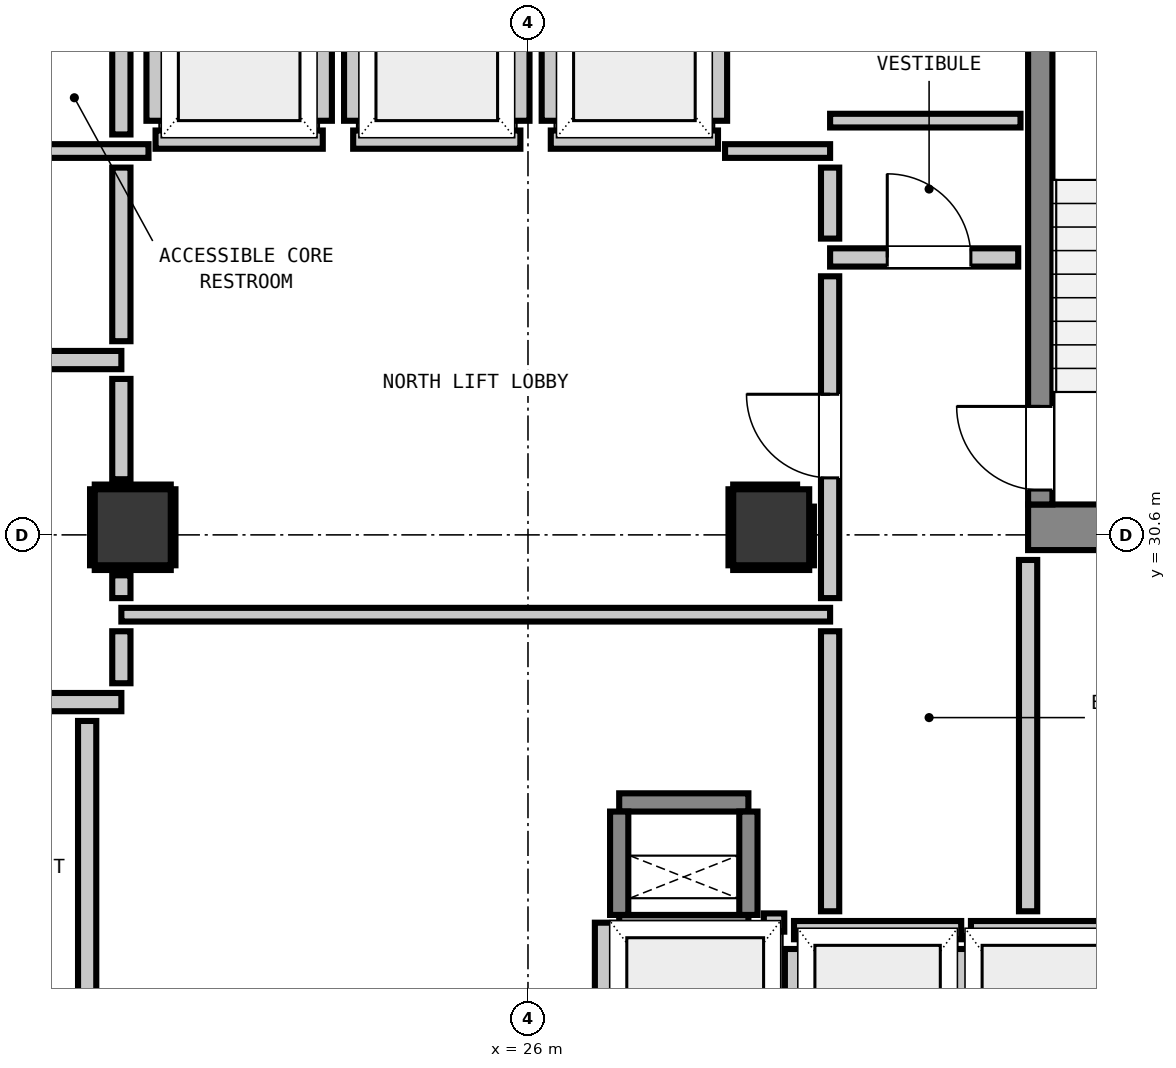
"""IFC4 building model, lengths in metres.
Left out: names, types, materials, properties, quantities, classifications, styles, units other than length and angle.
Written with IfcOpenShell. Run it as: python <this file> out.ifc"""

import sys

from ifc_helpers import new_model, si_unit, direction, frame, frame_2d, origin, origin_2d, place, context, subcontext, project, spatial, rectangle, extrude, element, fill, save


model = new_model("IFC4")
c1 = context("Model", 3, precision=1e-05, world=origin(), true_north=direction((0.0, 1.0)))
c2 = subcontext(c1, "Body", "Model", "MODEL_VIEW")
j1 = project(units=[si_unit("LENGTHUNIT", "METRE"), si_unit("PLANEANGLEUNIT", "RADIAN")], contexts=[c1])
p1 = place(None, origin())
s1 = spatial("IfcSite", under=j1, at=p1, CompositionType="ELEMENT")
p2 = place(p1, origin())
s2 = spatial("IfcBuilding", under=s1, at=p2, CompositionType="ELEMENT")
p3 = place(p2, frame((0.0, 0.0, 68.48)))
s3 = spatial("IfcBuildingStorey", under=s2, at=p3, CompositionType="ELEMENT", Elevation=68.48)
p4 = place(p3, frame((32.58, 30.7, 0.0), z_axis=(0.0, 0.0, 1.0), x_axis=(1.0, 0.0, 0.0)))
e1 = element("IfcWall", 1, at=p4, inside=s3, PredefinedType="SHEAR", context=c2, shape_type="SweptSolid", body=[
    extrude(rectangle(XDim=3.415, YDim=0.6, at=frame_2d((1.708, 0.0))), origin(), (0.0, 0.0, 1.0), 3.32),
])
p5 = place(p3, frame((32.74, 31.0, 0.0), z_axis=(0.0, 0.0, 1.0), x_axis=(0.0, 1.0, 0.0)))
e2 = element("IfcWall", 2, at=p5, inside=s3, PredefinedType="SHEAR", context=c2, shape_type="SweptSolid", body=[
    extrude(rectangle(XDim=7.8, YDim=0.32, at=frame_2d((3.9, 0.0))), origin(), (0.0, 0.0, 1.0), 3.32),
])
p6 = place(p5, frame((0.19, 0.0, 0.0)))
e3 = element("IfcOpeningElement", 3, at=p6, cuts=e2, PredefinedType="OPENING", context=c2, shape_type="SweptSolid", body=[
    extrude(rectangle(XDim=1.1, YDim=2.15, at=frame_2d((0.55, 1.075))), frame((0.0, 0.17, 0.0), z_axis=(0.0, -1.0, 0.0), x_axis=(1.0, 0.0, 0.0)), (0.0, 0.0, 1.0), 0.34),
])
for number, where, z_axis, x_axis in (
    (4, (27.2, 25.48, 0.0), (0.0, 0.0, 1.0), (1.0, 0.0, 0.0)),
    (5, (27.2, 27.08, 0.0), (0.0, 0.0, 1.0), (1.0, 0.0, 0.0)),
):
    element("IfcWall", number, at=place(p3, frame(where, z_axis=z_axis, x_axis=x_axis)), inside=s3, PredefinedType="SHEAR", context=c2, shape_type="SweptSolid", body=[
        extrude(rectangle(XDim=1.7, YDim=0.24, at=frame_2d((0.85, 0.0))), origin(), (0.0, 0.0, 1.0), 3.32),
    ])
for number, where, z_axis, x_axis in (
    (6, (27.2, 25.6, 0.0), (0.0, 0.0, 1.0), (0.0, 1.0, 0.0)),
    (7, (28.9, 25.6, 0.0), (0.0, 0.0, 1.0), (0.0, 1.0, 0.0)),
):
    element("IfcWall", number, at=place(p3, frame(where, z_axis=z_axis, x_axis=x_axis)), inside=s3, PredefinedType="SHEAR", context=c2, shape_type="SweptSolid", body=[
        extrude(rectangle(XDim=1.36, YDim=0.24, at=frame_2d((0.68, 0.0))), origin(), (0.0, 0.0, 1.0), 3.32),
    ])
for number, where, z_axis, x_axis in (
    (8, (20.8, 30.7, 0.0), (0.0, 0.0, 1.0), (1.0, 0.0, 0.0)),
    (9, (29.2, 30.7, 0.0), (0.0, 0.0, 1.0), (1.0, 0.0, 0.0)),
):
    element("IfcColumn", number, at=place(p3, frame(where, z_axis=z_axis, x_axis=x_axis)), inside=s3, PredefinedType="COLUMN", context=c2, shape_type="SweptSolid", body=[
        extrude(rectangle(XDim=1.0, YDim=1.0, at=origin_2d()), origin(), (0.0, 0.0, 1.0), 3.32),
    ])
p7 = place(p3, frame((21.1, 35.8, 0.0), z_axis=(0.0, 0.0, 1.0), x_axis=(1.0, 0.0, 0.0)))
e10 = element("IfcWall", 10, at=p7, inside=s3, PredefinedType="PARTITIONING", context=c2, shape_type="SweptSolid", body=[
    extrude(rectangle(XDim=2.2, YDim=0.24, at=frame_2d((1.1, 0.0))), origin(), (0.0, 0.0, 1.0), 3.06),
])
p8 = place(p3, frame((21.1, 36.048, 0.0), z_axis=(0.0, 0.0, 1.0), x_axis=(0.0, 1.0, 0.0)))
e11 = element("IfcWall", 11, at=p8, inside=s3, PredefinedType="PARTITIONING", context=c2, shape_type="SweptSolid", body=[
    extrude(rectangle(XDim=2.104, YDim=0.24, at=frame_2d((1.052, 0.0))), origin(), (0.0, 0.0, 1.0), 2.295),
])
p9 = place(p3, frame((23.3, 36.048, 0.0), z_axis=(0.0, 0.0, 1.0), x_axis=(0.0, 1.0, 0.0)))
e12 = element("IfcWall", 12, at=p9, inside=s3, PredefinedType="PARTITIONING", context=c2, shape_type="SweptSolid", body=[
    extrude(rectangle(XDim=2.104, YDim=0.24, at=frame_2d((1.052, 0.0))), origin(), (0.0, 0.0, 1.0), 3.06),
])
p10 = place(p3, frame((23.7, 35.8, 0.0), z_axis=(0.0, 0.0, 1.0), x_axis=(1.0, 0.0, 0.0)))
e13 = element("IfcWall", 13, at=p10, inside=s3, PredefinedType="PARTITIONING", context=c2, shape_type="SweptSolid", body=[
    extrude(rectangle(XDim=2.2, YDim=0.24, at=frame_2d((1.1, 0.0))), origin(), (0.0, 0.0, 1.0), 3.06),
])
for number, where, z_axis, x_axis in (
    (14, (23.7, 36.048, 0.0), (0.0, 0.0, 1.0), (0.0, 1.0, 0.0)),
    (15, (25.9, 36.048, 0.0), (0.0, 0.0, 1.0), (0.0, 1.0, 0.0)),
):
    element("IfcWall", number, at=place(p3, frame(where, z_axis=z_axis, x_axis=x_axis)), inside=s3, PredefinedType="PARTITIONING", context=c2, shape_type="SweptSolid", body=[
        extrude(rectangle(XDim=2.104, YDim=0.24, at=frame_2d((1.052, 0.0))), origin(), (0.0, 0.0, 1.0), 3.06),
    ])
p11 = place(p3, frame((26.3, 35.8, 0.0), z_axis=(0.0, 0.0, 1.0), x_axis=(1.0, 0.0, 0.0)))
e16 = element("IfcWall", 16, at=p11, inside=s3, PredefinedType="PARTITIONING", context=c2, shape_type="SweptSolid", body=[
    extrude(rectangle(XDim=2.2, YDim=0.24, at=frame_2d((1.1, 0.0))), origin(), (0.0, 0.0, 1.0), 3.06),
])
for number, where, z_axis, x_axis in (
    (17, (26.3, 36.048, 0.0), (0.0, 0.0, 1.0), (0.0, 1.0, 0.0)),
    (18, (28.5, 36.048, 0.0), (0.0, 0.0, 1.0), (0.0, 1.0, 0.0)),
):
    element("IfcWall", number, at=place(p3, frame(where, z_axis=z_axis, x_axis=x_axis)), inside=s3, PredefinedType="PARTITIONING", context=c2, shape_type="SweptSolid", body=[
        extrude(rectangle(XDim=2.104, YDim=0.24, at=frame_2d((1.052, 0.0))), origin(), (0.0, 0.0, 1.0), 3.06),
    ])
p12 = place(p3, frame((29.5, 25.4, 0.0), z_axis=(0.0, 0.0, 1.0), x_axis=(1.0, 0.0, 0.0)))
e19 = element("IfcWall", 19, at=p12, inside=s3, PredefinedType="PARTITIONING", context=c2, shape_type="SweptSolid", body=[
    extrude(rectangle(XDim=2.2, YDim=0.24, at=frame_2d((1.1, 0.0))), origin(), (0.0, 0.0, 1.0), 3.06),
])
p13 = place(p3, frame((29.5, 22.632, 0.0), z_axis=(0.0, 0.0, 1.0), x_axis=(0.0, 1.0, 0.0)))
e20 = element("IfcWall", 20, at=p13, inside=s3, PredefinedType="PARTITIONING", context=c2, shape_type="SweptSolid", body=[
    extrude(rectangle(XDim=2.52, YDim=0.24, at=frame_2d((1.26, 0.0))), origin(), (0.0, 0.0, 1.0), 2.295),
])
p14 = place(p3, frame((31.7, 22.73, 0.0), z_axis=(0.0, 0.0, 1.0), x_axis=(0.0, 1.0, 0.0)))
e21 = element("IfcWall", 21, at=p14, inside=s3, PredefinedType="PARTITIONING", context=c2, shape_type="SweptSolid", body=[
    extrude(rectangle(XDim=2.422, YDim=0.24, at=frame_2d((1.211, 0.0))), origin(), (0.0, 0.0, 1.0), 3.06),
])
p15 = place(p3, frame((31.828, 25.4, 0.0), z_axis=(0.0, 0.0, 1.0), x_axis=(1.0, 0.0, 0.0)))
e22 = element("IfcWall", 22, at=p15, inside=s3, PredefinedType="PARTITIONING", context=c2, shape_type="SweptSolid", body=[
    extrude(rectangle(XDim=2.072, YDim=0.24, at=frame_2d((1.036, 0.0))), origin(), (0.0, 0.0, 1.0), 3.06),
])
p16 = place(p3, frame((29.103, 25.5, 0.0), z_axis=(0.0, 0.0, 1.0), x_axis=(1.0, 0.0, 0.0)))
e23 = element("IfcWall", 23, at=p16, inside=s3, PredefinedType="PARTITIONING", context=c2, shape_type="SweptSolid", body=[
    extrude(rectangle(XDim=0.269, YDim=0.24, at=frame_2d((0.135, 0.0))), origin(), (0.0, 0.0, 1.0), 3.06),
])
p17 = place(p3, frame((27.0, 22.73, 0.0), z_axis=(0.0, 0.0, 1.0), x_axis=(0.0, 1.0, 0.0)))
e24 = element("IfcWall", 24, at=p17, inside=s3, PredefinedType="PARTITIONING", context=c2, shape_type="SweptSolid", body=[
    extrude(rectangle(XDim=2.768, YDim=0.24, at=frame_2d((1.384, 0.0))), origin(), (0.0, 0.0, 1.0), 3.06),
])
p18 = place(p3, frame((17.45, 28.4, 0.0), z_axis=(0.0, 0.0, 1.0), x_axis=(1.0, 0.0, 0.0)))
e25 = element("IfcWall", 25, at=p18, inside=s3, PredefinedType="PARTITIONING", context=c2, shape_type="SweptSolid", body=[
    extrude(rectangle(XDim=3.2, YDim=0.24, at=frame_2d((1.6, 0.0))), origin(), (0.0, 0.0, 1.0), 3.06),
])
p19 = place(p18, frame((0.784, 0.0, 0.0)))
e26 = element("IfcOpeningElement", 26, at=p19, cuts=e25, PredefinedType="OPENING", context=c2, shape_type="SweptSolid", body=[
    extrude(rectangle(XDim=1.1, YDim=2.15, at=frame_2d((0.55, 1.075))), frame((0.0, 0.13, 0.0), z_axis=(0.0, -1.0, 0.0), x_axis=(1.0, 0.0, 0.0)), (0.0, 0.0, 1.0), 0.26),
])
p20 = place(p3, frame((17.45, 32.9, 0.0), z_axis=(0.0, 0.0, 1.0), x_axis=(1.0, 0.0, 0.0)))
e27 = element("IfcWall", 27, at=p20, inside=s3, PredefinedType="PARTITIONING", context=c2, shape_type="SweptSolid", body=[
    extrude(rectangle(XDim=3.2, YDim=0.24, at=frame_2d((1.6, 0.0))), origin(), (0.0, 0.0, 1.0), 3.06),
])
p21 = place(p20, frame((0.159, 0.0, 0.0)))
e28 = element("IfcOpeningElement", 28, at=p21, cuts=e27, PredefinedType="OPENING", context=c2, shape_type="SweptSolid", body=[
    extrude(rectangle(XDim=1.1, YDim=2.15, at=frame_2d((0.55, 1.075))), frame((0.0, 0.13, 0.0), z_axis=(0.0, -1.0, 0.0), x_axis=(1.0, 0.0, 0.0)), (0.0, 0.0, 1.0), 0.26),
])
p22 = place(p3, frame((29.975, 34.25, 0.0), z_axis=(0.0, 0.0, 1.0), x_axis=(1.0, 0.0, 0.0)))
e29 = element("IfcWall", 29, at=p22, inside=s3, PredefinedType="PARTITIONING", context=c2, shape_type="SweptSolid", body=[
    extrude(rectangle(XDim=2.475, YDim=0.24, at=frame_2d((1.237, 0.0))), origin(), (0.0, 0.0, 1.0), 3.06),
])
p23 = place(p22, frame((0.752, 0.0, 0.0)))
e30 = element("IfcOpeningElement", 30, at=p23, cuts=e29, PredefinedType="OPENING", context=c2, shape_type="SweptSolid", body=[
    extrude(rectangle(XDim=1.1, YDim=2.15, at=frame_2d((0.55, 1.075))), frame((0.0, 0.13, 0.0), z_axis=(0.0, -1.0, 0.0), x_axis=(1.0, 0.0, 0.0)), (0.0, 0.0, 1.0), 0.26),
])
p24 = place(p3, frame((20.65, 29.55, 0.0), z_axis=(0.0, 0.0, 1.0), x_axis=(1.0, 0.0, 0.0)))
e31 = element("IfcWall", 31, at=p24, inside=s3, PredefinedType="PARTITIONING", context=c2, shape_type="SweptSolid", body=[
    extrude(rectangle(XDim=9.325, YDim=0.18, at=frame_2d((4.663, 0.0))), origin(), (0.0, 0.0, 1.0), 3.06),
])
p25 = place(p3, frame((18.95, 35.65, 0.0), z_axis=(0.0, 0.0, 1.0), x_axis=(1.0, 0.0, 0.0)))
e32 = element("IfcWall", 32, at=p25, inside=s3, PredefinedType="PARTITIONING", context=c2, shape_type="SweptSolid", body=[
    extrude(rectangle(XDim=2.057, YDim=0.18, at=frame_2d((1.029, 0.0))), origin(), (0.0, 0.0, 1.0), 3.06),
])
p26 = place(p3, frame((28.593, 35.65, 0.0), z_axis=(0.0, 0.0, 1.0), x_axis=(1.0, 0.0, 0.0)))
e33 = element("IfcWall", 33, at=p26, inside=s3, PredefinedType="PARTITIONING", context=c2, shape_type="SweptSolid", body=[
    extrude(rectangle(XDim=1.382, YDim=0.18, at=frame_2d((0.691, 0.0))), origin(), (0.0, 0.0, 1.0), 3.06),
])
p27 = place(p3, frame((29.975, 36.05, 0.0), z_axis=(0.0, 0.0, 1.0), x_axis=(1.0, 0.0, 0.0)))
e34 = element("IfcWall", 34, at=p27, inside=s3, PredefinedType="PARTITIONING", context=c2, shape_type="SweptSolid", body=[
    extrude(rectangle(XDim=2.505, YDim=0.18, at=frame_2d((1.252, 0.0))), origin(), (0.0, 0.0, 1.0), 3.06),
])
p28 = place(p3, frame((20.2, 22.586, 0.0), z_axis=(0.0, 0.0, 1.0), x_axis=(0.0, 1.0, 0.0)))
e35 = element("IfcWall", 35, at=p28, inside=s3, PredefinedType="PARTITIONING", context=c2, shape_type="SweptSolid", body=[
    extrude(rectangle(XDim=5.566, YDim=0.24, at=frame_2d((2.783, 0.0))), origin(), (0.0, 0.0, 1.0), 3.06),
])
p29 = place(p3, frame((20.65, 28.648, 0.0), z_axis=(0.0, 0.0, 1.0), x_axis=(0.0, 1.0, 0.0)))
e36 = element("IfcWall", 36, at=p29, inside=s3, PredefinedType="PARTITIONING", context=c2, shape_type="SweptSolid", body=[
    extrude(rectangle(XDim=0.684, YDim=0.24, at=frame_2d((0.342, 0.0))), origin(), (0.0, 0.0, 1.0), 2.295),
])
p30 = place(p3, frame((20.65, 29.768, 0.0), z_axis=(0.0, 0.0, 1.0), x_axis=(0.0, 1.0, 0.0)))
e37 = element("IfcWall", 37, at=p30, inside=s3, PredefinedType="PARTITIONING", context=c2, shape_type="SweptSolid", body=[
    extrude(rectangle(XDim=0.3, YDim=0.24, at=frame_2d((0.15, 0.0))), origin(), (0.0, 0.0, 1.0), 2.295),
])
p31 = place(p3, frame((20.65, 31.332, 0.0), z_axis=(0.0, 0.0, 1.0), x_axis=(0.0, 1.0, 0.0)))
e38 = element("IfcWall", 38, at=p31, inside=s3, PredefinedType="PARTITIONING", context=c2, shape_type="SweptSolid", body=[
    extrude(rectangle(XDim=1.32, YDim=0.24, at=frame_2d((0.66, 0.0))), origin(), (0.0, 0.0, 1.0), 2.295),
])
p32 = place(p3, frame((20.65, 33.148, 0.0), z_axis=(0.0, 0.0, 1.0), x_axis=(0.0, 1.0, 0.0)))
e39 = element("IfcWall", 39, at=p32, inside=s3, PredefinedType="PARTITIONING", context=c2, shape_type="SweptSolid", body=[
    extrude(rectangle(XDim=2.284, YDim=0.24, at=frame_2d((1.142, 0.0))), origin(), (0.0, 0.0, 1.0), 2.295),
])
p33 = place(p3, frame((20.65, 35.868, 0.0), z_axis=(0.0, 0.0, 1.0), x_axis=(0.0, 1.0, 0.0)))
e40 = element("IfcWall", 40, at=p33, inside=s3, PredefinedType="PARTITIONING", context=c2, shape_type="SweptSolid", body=[
    extrude(rectangle(XDim=2.684, YDim=0.24, at=frame_2d((1.342, 0.0))), origin(), (0.0, 0.0, 1.0), 2.295),
])
p34 = place(p3, frame((29.975, 25.648, 0.0), z_axis=(0.0, 0.0, 1.0), x_axis=(0.0, 1.0, 0.0)))
e41 = element("IfcWall", 41, at=p34, inside=s3, PredefinedType="PARTITIONING", context=c2, shape_type="SweptSolid", body=[
    extrude(rectangle(XDim=3.684, YDim=0.24, at=frame_2d((1.842, 0.0))), origin(), (0.0, 0.0, 1.0), 3.06),
])
p35 = place(p3, frame((29.975, 29.768, 0.0), z_axis=(0.0, 0.0, 1.0), x_axis=(0.0, 1.0, 0.0)))
e42 = element("IfcWall", 42, at=p35, inside=s3, PredefinedType="PARTITIONING", context=c2, shape_type="SweptSolid", body=[
    extrude(rectangle(XDim=4.234, YDim=0.24, at=frame_2d((2.117, 0.0))), origin(), (0.0, 0.0, 1.0), 3.06),
])
p36 = place(p35, frame((1.582, 0.0, 0.0)))
e43 = element("IfcOpeningElement", 43, at=p36, cuts=e42, PredefinedType="OPENING", context=c2, shape_type="SweptSolid", body=[
    extrude(rectangle(XDim=1.1, YDim=2.15, at=frame_2d((0.55, 1.075))), frame((0.0, 0.13, 0.0), z_axis=(0.0, -1.0, 0.0), x_axis=(1.0, 0.0, 0.0)), (0.0, 0.0, 1.0), 0.26),
])
p37 = place(p3, frame((29.975, 34.498, 0.0), z_axis=(0.0, 0.0, 1.0), x_axis=(0.0, 1.0, 0.0)))
e44 = element("IfcWall", 44, at=p37, inside=s3, PredefinedType="PARTITIONING", context=c2, shape_type="SweptSolid", body=[
    extrude(rectangle(XDim=0.934, YDim=0.24, at=frame_2d((0.467, 0.0))), origin(), (0.0, 0.0, 1.0), 3.06),
])
p38 = place(p3, frame((32.58, 25.648, 0.0), z_axis=(0.0, 0.0, 1.0), x_axis=(0.0, 1.0, 0.0)))
e45 = element("IfcWall", 45, at=p38, inside=s3, PredefinedType="PARTITIONING", context=c2, shape_type="SweptSolid", body=[
    extrude(rectangle(XDim=4.622, YDim=0.24, at=frame_2d((2.311, 0.0))), origin(), (0.0, 0.0, 1.0), 3.06),
])
for number, where, z_axis, x_axis in (
    (46, (20.3, 30.168, 0.0), (0.0, 0.0, 1.0), (1.0, 0.0, 0.0)),
    (47, (20.3, 31.232, 0.0), (0.0, 0.0, 1.0), (1.0, 0.0, 0.0)),
    (48, (20.268, 30.2, 0.0), (0.0, 0.0, 1.0), (0.0, 1.0, 0.0)),
    (49, (21.332, 30.2, 0.0), (0.0, 0.0, 1.0), (0.0, 1.0, 0.0)),
    (50, (28.7, 30.168, 0.0), (0.0, 0.0, 1.0), (1.0, 0.0, 0.0)),
):
    element("IfcWall", number, at=place(p3, frame(where, z_axis=z_axis, x_axis=x_axis)), inside=s3, PredefinedType="PARTITIONING", context=c2, shape_type="SweptSolid", body=[
        extrude(rectangle(XDim=1.0, YDim=0.06, at=frame_2d((0.5, 0.0))), origin(), (0.0, 0.0, 1.0), 1.45),
    ])
p39 = place(p3, frame((28.7, 31.232, 0.0), z_axis=(0.0, 0.0, 1.0), x_axis=(1.0, 0.0, 0.0)))
e51 = element("IfcWall", 51, at=p39, inside=s3, PredefinedType="PARTITIONING", context=c2, shape_type="SweptSolid", body=[
    extrude(rectangle(XDim=0.841, YDim=0.06, at=frame_2d((0.42, 0.0))), origin(), (0.0, 0.0, 1.0), 1.45),
])
p40 = place(p3, frame((28.668, 30.2, 0.0), z_axis=(0.0, 0.0, 1.0), x_axis=(0.0, 1.0, 0.0)))
e52 = element("IfcWall", 52, at=p40, inside=s3, PredefinedType="PARTITIONING", context=c2, shape_type="SweptSolid", body=[
    extrude(rectangle(XDim=1.0, YDim=0.06, at=frame_2d((0.5, 0.0))), origin(), (0.0, 0.0, 1.0), 1.45),
])
p41 = place(p3, frame((29.732, 30.2, 0.0), z_axis=(0.0, 0.0, 1.0), x_axis=(0.0, 1.0, 0.0)))
e53 = element("IfcWall", 53, at=p41, inside=s3, PredefinedType="PARTITIONING", context=c2, shape_type="SweptSolid", body=[
    extrude(rectangle(XDim=0.772, YDim=0.06, at=frame_2d((0.386, 0.0))), origin(), (0.0, 0.0, 1.0), 1.45),
])
p42 = place(p6, origin())
e54 = element("IfcDoor", 54, at=p42, inside=s3, OperationType="SINGLE_SWING_RIGHT", PredefinedType="DOOR", context=c2, shape_type="SweptSolid", body=[
    extrude(rectangle(XDim=1.1, YDim=2.15, at=frame_2d((0.55, 1.075))), frame((0.0, 0.025, 0.0), z_axis=(0.0, -1.0, 0.0), x_axis=(1.0, 0.0, 0.0)), (0.0, 0.0, 1.0), 0.05),
])
fill(e3, e54)
p43 = place(p36, origin())
e55 = element("IfcDoor", 55, at=p43, inside=s3, OperationType="SINGLE_SWING_RIGHT", PredefinedType="DOOR", context=c2, shape_type="SweptSolid", body=[
    extrude(rectangle(XDim=1.1, YDim=2.15, at=frame_2d((0.55, 1.075))), frame((0.0, 0.025, 0.0), z_axis=(0.0, -1.0, 0.0), x_axis=(1.0, 0.0, 0.0)), (0.0, 0.0, 1.0), 0.05),
])
fill(e43, e55)
p44 = place(p23, origin())
e56 = element("IfcDoor", 56, at=p44, inside=s3, OperationType="SINGLE_SWING_LEFT", PredefinedType="DOOR", context=c2, shape_type="SweptSolid", body=[
    extrude(rectangle(XDim=1.1, YDim=2.15, at=frame_2d((0.55, 1.075))), frame((0.0, 0.025, 0.0), z_axis=(0.0, -1.0, 0.0), x_axis=(1.0, 0.0, 0.0)), (0.0, 0.0, 1.0), 0.05),
])
fill(e30, e56)
save(model, sys.argv[1])
